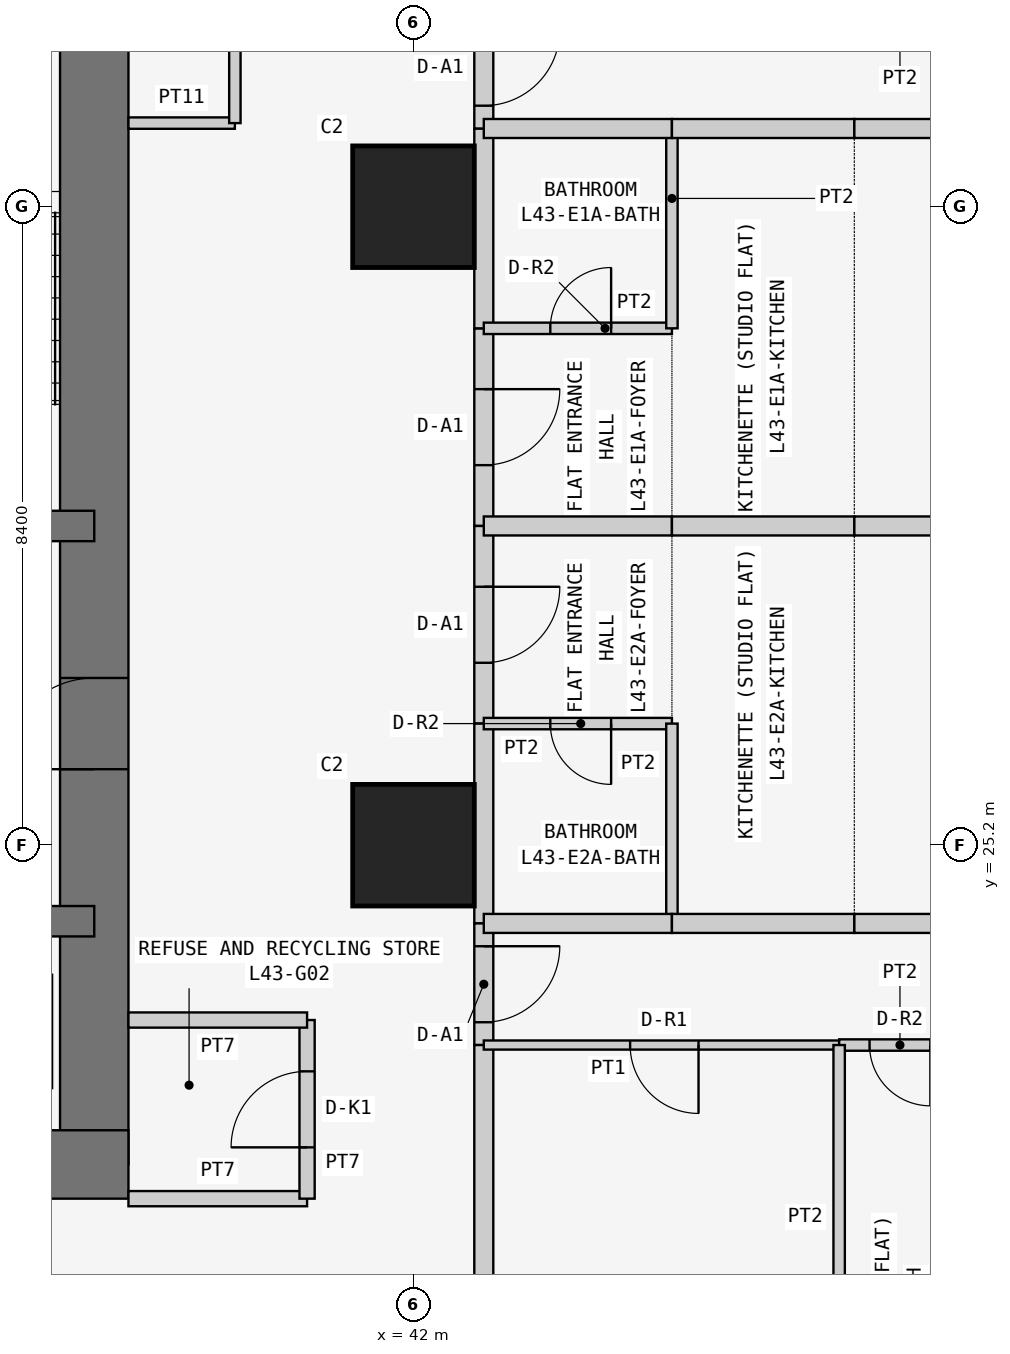
"""IFC4 building model, lengths in metres.
Left out: names, types, materials, properties, quantities, classifications, styles, units other than length and angle.
Written with IfcOpenShell. Run it as: python <this file> out.ifc"""

import sys

from ifc_helpers import new_model, si_unit, direction, frame, frame_2d, origin, origin_2d, place, context, subcontext, project, spatial, rectangle, extrude, element, fill, save


model = new_model("IFC4")
c1 = context("Model", 3, precision=1e-05, world=origin(), true_north=direction((0.0, 1.0)))
c2 = subcontext(c1, "Body", "Model", "MODEL_VIEW")
j1 = project(units=[si_unit("LENGTHUNIT", "METRE"), si_unit("PLANEANGLEUNIT", "RADIAN")], contexts=[c1])
p1 = place(None, origin())
s1 = spatial("IfcSite", under=j1, at=p1, CompositionType="ELEMENT")
p2 = place(p1, origin())
s2 = spatial("IfcBuilding", under=s1, at=p2, CompositionType="ELEMENT")
p3 = place(p2, frame((0.0, 0.0, 166.5)))
s3 = spatial("IfcBuildingStorey", under=s2, at=p3, CompositionType="ELEMENT", Elevation=166.5)
for number, where, z_axis, x_axis in (
    (1, (42.0, 25.2, 0.0), (0.0, 0.0, 1.0), (1.0, 0.0, 0.0)),
    (2, (42.0, 33.6, 0.0), (0.0, 0.0, 1.0), (1.0, 0.0, 0.0)),
):
    element("IfcColumn", number, at=place(p3, frame(where, z_axis=z_axis, x_axis=x_axis)), inside=s3, PredefinedType="COLUMN", context=c2, shape_type="SweptSolid", body=[
        extrude(rectangle(XDim=1.6, YDim=1.6, at=origin_2d()), origin(), (0.0, 0.0, 1.0), 3.6),
    ])
p4 = place(p3, frame((21.0, 21.0, 0.0), z_axis=(0.0, 0.0, 1.0), x_axis=(1.0, 0.0, 0.0)))
e3 = element("IfcWall", 3, at=p4, inside=s3, PredefinedType="SHEAR", context=c2, shape_type="SweptSolid", body=[
    extrude(rectangle(XDim=17.25, YDim=0.9, at=frame_2d((8.625, 0.0))), origin(), (0.0, 0.0, 1.0), 3.6),
])
p5 = place(p3, frame((37.8, 21.0, 0.0), z_axis=(0.0, 0.0, 1.0), x_axis=(0.0, 1.0, 0.0)))
e4 = element("IfcWall", 4, at=p5, inside=s3, PredefinedType="SHEAR", context=c2, shape_type="SweptSolid", body=[
    extrude(rectangle(XDim=17.25, YDim=0.9, at=frame_2d((8.625, 0.0))), origin(), (0.0, 0.0, 1.0), 3.6),
])
p6 = place(p5, frame((5.2, 0.0, 0.0)))
e5 = element("IfcOpeningElement", 5, at=p6, cuts=e4, PredefinedType="OPENING", context=c2, shape_type="SweptSolid", body=[
    extrude(rectangle(XDim=1.2, YDim=2.1, at=frame_2d((0.6, 1.05))), frame((0.0, 0.46, 0.0), z_axis=(0.0, -1.0, 0.0), x_axis=(1.0, 0.0, 0.0)), (0.0, 0.0, 1.0), 0.92),
])
p7 = place(p3, frame((26.6, 24.2, 0.0), z_axis=(0.0, 0.0, 1.0), x_axis=(1.0, 0.0, 0.0)))
e6 = element("IfcWall", 6, at=p7, inside=s3, PredefinedType="SHEAR", context=c2, shape_type="SweptSolid", body=[
    extrude(rectangle(XDim=11.2, YDim=0.4, at=frame_2d((5.6, 0.0))), origin(), (0.0, 0.0, 1.0), 3.6),
])
p8 = place(p7, frame((0.85, 0.0, 0.0)))
e7 = element("IfcOpeningElement", 7, at=p8, cuts=e6, PredefinedType="OPENING", context=c2, shape_type="SweptSolid", body=[
    extrude(rectangle(XDim=1.1, YDim=2.1, at=frame_2d((0.55, 1.05))), frame((0.0, 0.21, 0.0), z_axis=(0.0, -1.0, 0.0), x_axis=(1.0, 0.0, 0.0)), (0.0, 0.0, 1.0), 0.42),
])
p9 = place(p7, frame((3.65, 0.0, 0.0)))
e8 = element("IfcOpeningElement", 8, at=p9, cuts=e6, PredefinedType="OPENING", context=c2, shape_type="SweptSolid", body=[
    extrude(rectangle(XDim=1.1, YDim=2.1, at=frame_2d((0.55, 1.05))), frame((0.0, 0.21, 0.0), z_axis=(0.0, -1.0, 0.0), x_axis=(1.0, 0.0, 0.0)), (0.0, 0.0, 1.0), 0.42),
])
p10 = place(p3, frame((32.2, 29.4, 0.0), z_axis=(0.0, 0.0, 1.0), x_axis=(1.0, 0.0, 0.0)))
e9 = element("IfcWall", 9, at=p10, inside=s3, PredefinedType="SHEAR", context=c2, shape_type="SweptSolid", body=[
    extrude(rectangle(XDim=5.6, YDim=0.4, at=frame_2d((2.8, 0.0))), origin(), (0.0, 0.0, 1.0), 3.6),
])
p11 = place(p10, frame((2.0, 0.0, 0.0)))
e10 = element("IfcOpeningElement", 10, at=p11, cuts=e9, PredefinedType="OPENING", context=c2, shape_type="SweptSolid", body=[
    extrude(rectangle(XDim=1.2, YDim=2.1, at=frame_2d((0.6, 1.05))), frame((0.0, 0.21, 0.0), z_axis=(0.0, -1.0, 0.0), x_axis=(1.0, 0.0, 0.0)), (0.0, 0.0, 1.0), 0.42),
])
p12 = place(p3, frame((38.25, 20.55, 0.0), z_axis=(0.0, 0.0, 1.0), x_axis=(1.0, 0.0, 0.0)))
e11 = element("IfcWall", 11, at=p12, inside=s3, PredefinedType="PARTITIONING", context=c2, shape_type="SweptSolid", body=[
    extrude(rectangle(XDim=2.35, YDim=0.2, at=frame_2d((1.175, 0.0))), origin(), (0.0, 0.0, 1.0), 3.45),
])
p13 = place(p3, frame((40.6, 20.55, 0.0), z_axis=(0.0, 0.0, 1.0), x_axis=(0.0, 1.0, 0.0)))
e12 = element("IfcWall", 12, at=p13, inside=s3, PredefinedType="PARTITIONING", context=c2, shape_type="SweptSolid", body=[
    extrude(rectangle(XDim=2.35, YDim=0.2, at=frame_2d((1.175, 0.0))), origin(), (0.0, 0.0, 1.0), 3.45),
])
p14 = place(p13, frame((0.675, 0.0, 0.0)))
e13 = element("IfcOpeningElement", 13, at=p14, cuts=e12, PredefinedType="OPENING", context=c2, shape_type="SweptSolid", body=[
    extrude(rectangle(XDim=1.0, YDim=2.1, at=frame_2d((0.5, 1.05))), frame((0.0, 0.11, 0.0), z_axis=(0.0, -1.0, 0.0), x_axis=(1.0, 0.0, 0.0)), (0.0, 0.0, 1.0), 0.22),
])
p15 = place(p3, frame((40.6, 22.9, 0.0), z_axis=(0.0, 0.0, 1.0), x_axis=(-1.0, 0.0, 0.0)))
e14 = element("IfcWall", 14, at=p15, inside=s3, PredefinedType="PARTITIONING", context=c2, shape_type="SweptSolid", body=[
    extrude(rectangle(XDim=2.35, YDim=0.2, at=frame_2d((1.175, 0.0))), origin(), (0.0, 0.0, 1.0), 3.45),
])
p16 = place(p3, frame((38.25, 34.7, 0.0), z_axis=(0.0, 0.0, 1.0), x_axis=(1.0, 0.0, 0.0)))
e15 = element("IfcWall", 15, at=p16, inside=s3, PredefinedType="PARTITIONING", context=c2, shape_type="SweptSolid", body=[
    extrude(rectangle(XDim=1.4, YDim=0.15, at=frame_2d((0.7, 0.0))), origin(), (0.0, 0.0, 1.0), 3.45),
])
p17 = place(p3, frame((39.65, 34.7, 0.0), z_axis=(0.0, 0.0, 1.0), x_axis=(0.0, 1.0, 0.0)))
e16 = element("IfcWall", 16, at=p17, inside=s3, PredefinedType="PARTITIONING", context=c2, shape_type="SweptSolid", body=[
    extrude(rectangle(XDim=3.55, YDim=0.15, at=frame_2d((1.775, 0.0))), origin(), (0.0, 0.0, 1.0), 3.45),
])
p18 = place(p17, frame((1.275, 0.0, 0.0)))
e17 = element("IfcOpeningElement", 17, at=p18, cuts=e16, PredefinedType="OPENING", context=c2, shape_type="SweptSolid", body=[
    extrude(rectangle(XDim=1.0, YDim=2.1, at=frame_2d((0.5, 1.05))), frame((0.0, 0.085, 0.0), z_axis=(0.0, -1.0, 0.0), x_axis=(1.0, 0.0, 0.0)), (0.0, 0.0, 1.0), 0.17),
])
p19 = place(p3, frame((42.925, 32.0, 0.0), z_axis=(0.0, 0.0, 1.0), x_axis=(0.0, -1.0, 0.0)))
e18 = element("IfcWall", 18, at=p19, inside=s3, PredefinedType="PARTITIONING", context=c2, shape_type="SweptSolid", body=[
    extrude(rectangle(XDim=2.6, YDim=0.25, at=frame_2d((1.3, 0.0))), origin(), (0.0, 0.0, 1.0), 3.45),
])
p20 = place(p19, frame((0.8, 0.0, 0.0)))
e19 = element("IfcOpeningElement", 19, at=p20, cuts=e18, PredefinedType="OPENING", context=c2, shape_type="SweptSolid", body=[
    extrude(rectangle(XDim=1.0, YDim=2.1, at=frame_2d((0.5, 1.05))), frame((0.0, 0.135, 0.0), z_axis=(0.0, -1.0, 0.0), x_axis=(1.0, 0.0, 0.0)), (0.0, 0.0, 1.0), 0.27),
])
p21 = place(p3, frame((42.925, 34.629, 0.0), z_axis=(0.0, 0.0, 1.0), x_axis=(0.0, -1.0, 0.0)))
e20 = element("IfcWall", 20, at=p21, inside=s3, PredefinedType="PARTITIONING", context=c2, shape_type="SweptSolid", body=[
    extrude(rectangle(XDim=2.629, YDim=0.25, at=frame_2d((1.314, 0.0))), origin(), (0.0, 0.0, 1.0), 3.45),
])
p22 = place(p3, frame((42.925, 36.229, 0.0), z_axis=(0.0, 0.0, 1.0), x_axis=(0.0, -1.0, 0.0)))
e21 = element("IfcWall", 21, at=p22, inside=s3, PredefinedType="PARTITIONING", context=c2, shape_type="SweptSolid", body=[
    extrude(rectangle(XDim=1.6, YDim=0.25, at=frame_2d((0.8, 0.0))), origin(), (0.0, 0.0, 1.0), 3.45),
])
p23 = place(p22, frame((0.3, 0.0, 0.0)))
e22 = element("IfcOpeningElement", 22, at=p23, cuts=e21, PredefinedType="OPENING", context=c2, shape_type="SweptSolid", body=[
    extrude(rectangle(XDim=1.0, YDim=2.1, at=frame_2d((0.5, 1.05))), frame((0.0, 0.135, 0.0), z_axis=(0.0, -1.0, 0.0), x_axis=(1.0, 0.0, 0.0)), (0.0, 0.0, 1.0), 0.27),
])
p24 = place(p3, frame((42.925, 29.4, 0.0), z_axis=(0.0, 0.0, 1.0), x_axis=(0.0, -1.0, 0.0)))
e23 = element("IfcWall", 23, at=p24, inside=s3, PredefinedType="PARTITIONING", context=c2, shape_type="SweptSolid", body=[
    extrude(rectangle(XDim=2.6, YDim=0.25, at=frame_2d((1.3, 0.0))), origin(), (0.0, 0.0, 1.0), 3.45),
])
p25 = place(p24, frame((0.8, 0.0, 0.0)))
e24 = element("IfcOpeningElement", 24, at=p25, cuts=e23, PredefinedType="OPENING", context=c2, shape_type="SweptSolid", body=[
    extrude(rectangle(XDim=1.0, YDim=2.1, at=frame_2d((0.5, 1.05))), frame((0.0, 0.135, 0.0), z_axis=(0.0, -1.0, 0.0), x_axis=(1.0, 0.0, 0.0)), (0.0, 0.0, 1.0), 0.27),
])
p26 = place(p3, frame((42.925, 26.8, 0.0), z_axis=(0.0, 0.0, 1.0), x_axis=(0.0, -1.0, 0.0)))
e25 = element("IfcWall", 25, at=p26, inside=s3, PredefinedType="PARTITIONING", context=c2, shape_type="SweptSolid", body=[
    extrude(rectangle(XDim=2.629, YDim=0.25, at=frame_2d((1.314, 0.0))), origin(), (0.0, 0.0, 1.0), 3.45),
])
p27 = place(p3, frame((42.925, 24.171, 0.0), z_axis=(0.0, 0.0, 1.0), x_axis=(0.0, -1.0, 0.0)))
e26 = element("IfcWall", 26, at=p27, inside=s3, PredefinedType="PARTITIONING", context=c2, shape_type="SweptSolid", body=[
    extrude(rectangle(XDim=1.6, YDim=0.25, at=frame_2d((0.8, 0.0))), origin(), (0.0, 0.0, 1.0), 3.45),
])
p28 = place(p27, frame((0.3, 0.0, 0.0)))
e27 = element("IfcOpeningElement", 27, at=p28, cuts=e26, PredefinedType="OPENING", context=c2, shape_type="SweptSolid", body=[
    extrude(rectangle(XDim=1.0, YDim=2.1, at=frame_2d((0.5, 1.05))), frame((0.0, 0.135, 0.0), z_axis=(0.0, -1.0, 0.0), x_axis=(1.0, 0.0, 0.0)), (0.0, 0.0, 1.0), 0.27),
])
p29 = place(p3, frame((42.925, 22.571, 0.0), z_axis=(0.0, 0.0, 1.0), x_axis=(0.0, -1.0, 0.0)))
e28 = element("IfcWall", 28, at=p29, inside=s3, PredefinedType="PARTITIONING", context=c2, shape_type="SweptSolid", body=[
    extrude(rectangle(XDim=6.471, YDim=0.25, at=frame_2d((3.235, 0.0))), origin(), (0.0, 0.0, 1.0), 3.45),
])
p30 = place(p3, frame((45.4, 32.0, 0.0), z_axis=(0.0, 0.0, 1.0), x_axis=(-1.0, 0.0, 0.0)))
e29 = element("IfcWall", 29, at=p30, inside=s3, PredefinedType="PARTITIONING", context=c2, shape_type="SweptSolid", body=[
    extrude(rectangle(XDim=2.475, YDim=0.15, at=frame_2d((1.237, 0.0))), origin(), (0.0, 0.0, 1.0), 3.45),
])
p31 = place(p30, frame((0.8, 0.0, 0.0)))
e30 = element("IfcOpeningElement", 30, at=p31, cuts=e29, PredefinedType="OPENING", context=c2, shape_type="SweptSolid", body=[
    extrude(rectangle(XDim=0.8, YDim=2.1, at=frame_2d((0.4, 1.05))), frame((0.0, 0.085, 0.0), z_axis=(0.0, -1.0, 0.0), x_axis=(1.0, 0.0, 0.0)), (0.0, 0.0, 1.0), 0.17),
])
p32 = place(p3, frame((42.925, 29.4, 0.0), z_axis=(0.0, 0.0, 1.0), x_axis=(1.0, 0.0, 0.0)))
e31 = element("IfcWall", 31, at=p32, inside=s3, PredefinedType="PARTITIONING", context=c2, shape_type="SweptSolid", body=[
    extrude(rectangle(XDim=2.475, YDim=0.25, at=frame_2d((1.237, 0.0))), origin(), (0.0, 0.0, 1.0), 3.45),
])
p33 = place(p3, frame((45.4, 32.0, 0.0), z_axis=(0.0, 0.0, 1.0), x_axis=(0.0, 1.0, 0.0)))
e32 = element("IfcWall", 32, at=p33, inside=s3, PredefinedType="PARTITIONING", context=c2, shape_type="SweptSolid", body=[
    extrude(rectangle(XDim=2.629, YDim=0.15, at=frame_2d((1.314, 0.0))), origin(), (0.0, 0.0, 1.0), 3.45),
])
p34 = place(p3, frame((45.4, 34.629, 0.0), z_axis=(0.0, 0.0, 1.0), x_axis=(-1.0, 0.0, 0.0)))
e33 = element("IfcWall", 33, at=p34, inside=s3, PredefinedType="PARTITIONING", context=c2, shape_type="SweptSolid", body=[
    extrude(rectangle(XDim=2.475, YDim=0.25, at=frame_2d((1.237, 0.0))), origin(), (0.0, 0.0, 1.0), 3.45),
])
for number, where, z_axis, x_axis in (
    (34, (47.8, 34.629, 0.0), (0.0, 0.0, 1.0), (-1.0, 0.0, 0.0)),
    (35, (45.4, 29.4, 0.0), (0.0, 0.0, 1.0), (1.0, 0.0, 0.0)),
):
    element("IfcWall", number, at=place(p3, frame(where, z_axis=z_axis, x_axis=x_axis)), inside=s3, PredefinedType="PARTITIONING", context=c2, shape_type="SweptSolid", body=[
        extrude(rectangle(XDim=2.4, YDim=0.25, at=frame_2d((1.2, 0.0))), origin(), (0.0, 0.0, 1.0), 3.45),
    ])
p35 = place(p3, frame((55.3, 34.629, 0.0), z_axis=(0.0, 0.0, 1.0), x_axis=(-1.0, 0.0, 0.0)))
e36 = element("IfcWall", 36, at=p35, inside=s3, PredefinedType="PARTITIONING", context=c2, shape_type="SweptSolid", body=[
    extrude(rectangle(XDim=7.5, YDim=0.25, at=frame_2d((3.75, 0.0))), origin(), (0.0, 0.0, 1.0), 3.45),
])
p36 = place(p3, frame((47.8, 29.4, 0.0), z_axis=(0.0, 0.0, 1.0), x_axis=(1.0, 0.0, 0.0)))
e37 = element("IfcWall", 37, at=p36, inside=s3, PredefinedType="PARTITIONING", context=c2, shape_type="SweptSolid", body=[
    extrude(rectangle(XDim=11.65, YDim=0.25, at=frame_2d((5.825, 0.0))), origin(), (0.0, 0.0, 1.0), 3.45),
])
p37 = place(p3, frame((45.4, 26.8, 0.0), z_axis=(0.0, 0.0, 1.0), x_axis=(-1.0, 0.0, 0.0)))
e38 = element("IfcWall", 38, at=p37, inside=s3, PredefinedType="PARTITIONING", context=c2, shape_type="SweptSolid", body=[
    extrude(rectangle(XDim=2.475, YDim=0.15, at=frame_2d((1.237, 0.0))), origin(), (0.0, 0.0, 1.0), 3.45),
])
p38 = place(p37, frame((0.8, 0.0, 0.0)))
e39 = element("IfcOpeningElement", 39, at=p38, cuts=e38, PredefinedType="OPENING", context=c2, shape_type="SweptSolid", body=[
    extrude(rectangle(XDim=0.8, YDim=2.1, at=frame_2d((0.4, 1.05))), frame((0.0, 0.085, 0.0), z_axis=(0.0, -1.0, 0.0), x_axis=(1.0, 0.0, 0.0)), (0.0, 0.0, 1.0), 0.17),
])
p39 = place(p3, frame((45.4, 26.8, 0.0), z_axis=(0.0, 0.0, 1.0), x_axis=(0.0, -1.0, 0.0)))
e40 = element("IfcWall", 40, at=p39, inside=s3, PredefinedType="PARTITIONING", context=c2, shape_type="SweptSolid", body=[
    extrude(rectangle(XDim=2.629, YDim=0.15, at=frame_2d((1.314, 0.0))), origin(), (0.0, 0.0, 1.0), 3.45),
])
p40 = place(p3, frame((45.4, 24.171, 0.0), z_axis=(0.0, 0.0, 1.0), x_axis=(-1.0, 0.0, 0.0)))
e41 = element("IfcWall", 41, at=p40, inside=s3, PredefinedType="PARTITIONING", context=c2, shape_type="SweptSolid", body=[
    extrude(rectangle(XDim=2.475, YDim=0.25, at=frame_2d((1.237, 0.0))), origin(), (0.0, 0.0, 1.0), 3.45),
])
p41 = place(p3, frame((47.8, 24.171, 0.0), z_axis=(0.0, 0.0, 1.0), x_axis=(-1.0, 0.0, 0.0)))
e42 = element("IfcWall", 42, at=p41, inside=s3, PredefinedType="PARTITIONING", context=c2, shape_type="SweptSolid", body=[
    extrude(rectangle(XDim=2.4, YDim=0.25, at=frame_2d((1.2, 0.0))), origin(), (0.0, 0.0, 1.0), 3.45),
])
p42 = place(p3, frame((55.3, 24.171, 0.0), z_axis=(0.0, 0.0, 1.0), x_axis=(-1.0, 0.0, 0.0)))
e43 = element("IfcWall", 43, at=p42, inside=s3, PredefinedType="PARTITIONING", context=c2, shape_type="SweptSolid", body=[
    extrude(rectangle(XDim=7.5, YDim=0.25, at=frame_2d((3.75, 0.0))), origin(), (0.0, 0.0, 1.0), 3.45),
])
p43 = place(p3, frame((47.6, 22.571, 0.0), z_axis=(0.0, 0.0, 1.0), x_axis=(-1.0, 0.0, 0.0)))
e44 = element("IfcWall", 44, at=p43, inside=s3, PredefinedType="PARTITIONING", context=c2, shape_type="SweptSolid", body=[
    extrude(rectangle(XDim=4.675, YDim=0.12, at=frame_2d((2.337, 0.0))), origin(), (0.0, 0.0, 1.0), 3.45),
])
p44 = place(p43, frame((1.85, 0.0, 0.0)))
e45 = element("IfcOpeningElement", 45, at=p44, cuts=e44, PredefinedType="OPENING", context=c2, shape_type="SweptSolid", body=[
    extrude(rectangle(XDim=0.9, YDim=2.1, at=frame_2d((0.45, 1.05))), frame((0.0, 0.07, 0.0), z_axis=(0.0, -1.0, 0.0), x_axis=(1.0, 0.0, 0.0)), (0.0, 0.0, 1.0), 0.14),
])
p45 = place(p3, frame((49.2, 22.571, 0.0), z_axis=(0.0, 0.0, 1.0), x_axis=(-1.0, 0.0, 0.0)))
e46 = element("IfcWall", 46, at=p45, inside=s3, PredefinedType="PARTITIONING", context=c2, shape_type="SweptSolid", body=[
    extrude(rectangle(XDim=1.6, YDim=0.15, at=frame_2d((0.8, 0.0))), origin(), (0.0, 0.0, 1.0), 3.45),
])
p46 = place(p45, frame((0.4, 0.0, 0.0)))
e47 = element("IfcOpeningElement", 47, at=p46, cuts=e46, PredefinedType="OPENING", context=c2, shape_type="SweptSolid", body=[
    extrude(rectangle(XDim=0.8, YDim=2.1, at=frame_2d((0.4, 1.05))), frame((0.0, 0.085, 0.0), z_axis=(0.0, -1.0, 0.0), x_axis=(1.0, 0.0, 0.0)), (0.0, 0.0, 1.0), 0.17),
])
p47 = place(p3, frame((47.6, 22.571, 0.0), z_axis=(0.0, 0.0, 1.0), x_axis=(0.0, -1.0, 0.0)))
e48 = element("IfcWall", 48, at=p47, inside=s3, PredefinedType="PARTITIONING", context=c2, shape_type="SweptSolid", body=[
    extrude(rectangle(XDim=6.471, YDim=0.15, at=frame_2d((3.235, 0.0))), origin(), (0.0, 0.0, 1.0), 3.45),
])
p48 = place(p14, origin())
e49 = element("IfcDoor", 49, at=p48, inside=s3, OperationType="SINGLE_SWING_LEFT", PredefinedType="DOOR", context=c2, shape_type="SweptSolid", body=[
    extrude(rectangle(XDim=1.0, YDim=2.1, at=frame_2d((0.5, 1.05))), frame((0.0, 0.025, 0.0), z_axis=(0.0, -1.0, 0.0), x_axis=(1.0, 0.0, 0.0)), (0.0, 0.0, 1.0), 0.05),
])
fill(e13, e49)
p49 = place(p20, origin())
e50 = element("IfcDoor", 50, at=p49, inside=s3, OperationType="SINGLE_SWING_LEFT", PredefinedType="DOOR", context=c2, shape_type="SweptSolid", body=[
    extrude(rectangle(XDim=1.0, YDim=2.1, at=frame_2d((0.5, 1.05))), frame((0.0, 0.025, 0.0), z_axis=(0.0, -1.0, 0.0), x_axis=(1.0, 0.0, 0.0)), (0.0, 0.0, 1.0), 0.05),
])
fill(e19, e50)
p50 = place(p31, frame((0.8, 0.0, 0.0), z_axis=(0.0, 0.0, 1.0), x_axis=(-1.0, 0.0, 0.0)))
e51 = element("IfcDoor", 51, at=p50, inside=s3, OperationType="SINGLE_SWING_RIGHT", PredefinedType="DOOR", context=c2, shape_type="SweptSolid", body=[
    extrude(rectangle(XDim=0.8, YDim=2.1, at=frame_2d((0.4, 1.05))), frame((0.0, 0.025, 0.0), z_axis=(0.0, -1.0, 0.0), x_axis=(1.0, 0.0, 0.0)), (0.0, 0.0, 1.0), 0.05),
])
fill(e30, e51)
p51 = place(p23, origin())
e52 = element("IfcDoor", 52, at=p51, inside=s3, OperationType="SINGLE_SWING_LEFT", PredefinedType="DOOR", context=c2, shape_type="SweptSolid", body=[
    extrude(rectangle(XDim=1.0, YDim=2.1, at=frame_2d((0.5, 1.05))), frame((0.0, 0.025, 0.0), z_axis=(0.0, -1.0, 0.0), x_axis=(1.0, 0.0, 0.0)), (0.0, 0.0, 1.0), 0.05),
])
fill(e22, e52)
p52 = place(p25, origin())
e53 = element("IfcDoor", 53, at=p52, inside=s3, OperationType="SINGLE_SWING_LEFT", PredefinedType="DOOR", context=c2, shape_type="SweptSolid", body=[
    extrude(rectangle(XDim=1.0, YDim=2.1, at=frame_2d((0.5, 1.05))), frame((0.0, 0.025, 0.0), z_axis=(0.0, -1.0, 0.0), x_axis=(1.0, 0.0, 0.0)), (0.0, 0.0, 1.0), 0.05),
])
fill(e24, e53)
p53 = place(p38, origin())
e54 = element("IfcDoor", 54, at=p53, inside=s3, OperationType="SINGLE_SWING_LEFT", PredefinedType="DOOR", context=c2, shape_type="SweptSolid", body=[
    extrude(rectangle(XDim=0.8, YDim=2.1, at=frame_2d((0.4, 1.05))), frame((0.0, 0.025, 0.0), z_axis=(0.0, -1.0, 0.0), x_axis=(1.0, 0.0, 0.0)), (0.0, 0.0, 1.0), 0.05),
])
fill(e39, e54)
p54 = place(p28, origin())
e55 = element("IfcDoor", 55, at=p54, inside=s3, OperationType="SINGLE_SWING_LEFT", PredefinedType="DOOR", context=c2, shape_type="SweptSolid", body=[
    extrude(rectangle(XDim=1.0, YDim=2.1, at=frame_2d((0.5, 1.05))), frame((0.0, 0.025, 0.0), z_axis=(0.0, -1.0, 0.0), x_axis=(1.0, 0.0, 0.0)), (0.0, 0.0, 1.0), 0.05),
])
fill(e27, e55)
p55 = place(p44, origin())
e56 = element("IfcDoor", 56, at=p55, inside=s3, OperationType="SINGLE_SWING_LEFT", PredefinedType="DOOR", context=c2, shape_type="SweptSolid", body=[
    extrude(rectangle(XDim=0.9, YDim=2.1, at=frame_2d((0.45, 1.05))), frame((0.0, 0.025, 0.0), z_axis=(0.0, -1.0, 0.0), x_axis=(1.0, 0.0, 0.0)), (0.0, 0.0, 1.0), 0.05),
])
fill(e45, e56)
p56 = place(p46, origin())
e57 = element("IfcDoor", 57, at=p56, inside=s3, OperationType="SINGLE_SWING_LEFT", PredefinedType="DOOR", context=c2, shape_type="SweptSolid", body=[
    extrude(rectangle(XDim=0.8, YDim=2.1, at=frame_2d((0.4, 1.05))), frame((0.0, 0.025, 0.0), z_axis=(0.0, -1.0, 0.0), x_axis=(1.0, 0.0, 0.0)), (0.0, 0.0, 1.0), 0.05),
])
fill(e47, e57)
p57 = place(p6, origin())
e58 = element("IfcDoor", 58, at=p57, inside=s3, OperationType="SINGLE_SWING_LEFT", PredefinedType="DOOR", context=c2, shape_type="SweptSolid", body=[
    extrude(rectangle(XDim=1.2, YDim=2.1, at=frame_2d((0.6, 1.05))), frame((0.0, 0.025, 0.0), z_axis=(0.0, -1.0, 0.0), x_axis=(1.0, 0.0, 0.0)), (0.0, 0.0, 1.0), 0.05),
])
fill(e5, e58)
save(model, sys.argv[1])
